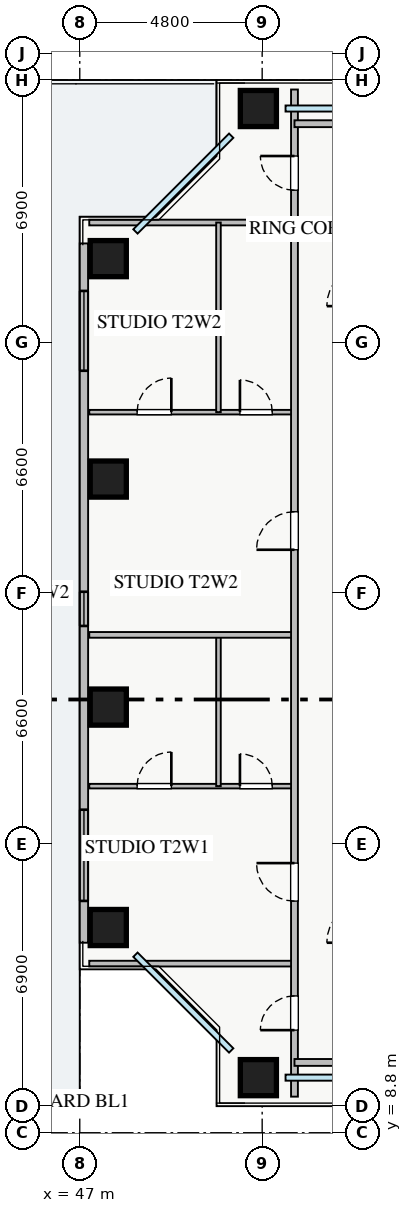
"""IFC4 building model, lengths in metres.
Left out: names, types, materials, properties, quantities, classifications, styles, units other than length and angle.
Written with IfcOpenShell. Run it as: python <this file> out.ifc"""

import sys

from ifc_helpers import new_model, si_unit, direction, frame, frame_2d, origin, origin_2d, place, context, subcontext, project, spatial, rectangle, extrude, source, transform, mapped, element, fill, save


model = new_model("IFC4")
c1 = context("Model", 3, precision=1e-05, world=origin(), true_north=direction((0.0, 1.0)))
c2 = subcontext(c1, "Body", "Model", "MODEL_VIEW")
j1 = project(units=[si_unit("LENGTHUNIT", "METRE"), si_unit("PLANEANGLEUNIT", "RADIAN")], contexts=[c1])
p1 = place(None, origin())
s1 = spatial("IfcSite", under=j1, at=p1, CompositionType="ELEMENT")
p2 = place(p1, origin())
s2 = spatial("IfcBuilding", under=s1, at=p2, CompositionType="ELEMENT")
p3 = place(p2, frame((0.0, 0.0, 23.0)))
s3 = spatial("IfcBuildingStorey", under=s2, at=p3, CompositionType="ELEMENT", Elevation=23.0)
m1 = source(origin(), c2, "Body", "SweptSolid", [
    extrude(rectangle(XDim=0.95, YDim=0.95, at=origin_2d()), origin(), (0.0, 0.0, 1.0), 3.25),
])
for number, where, z_axis, x_axis in (
    (1, (51.7, 10.25, 0.0), (0.0, 0.0, 1.0), (1.0, 0.0, 0.0)),
    (2, (51.7, 35.75, 0.0), (0.0, 0.0, 1.0), (1.0, 0.0, 0.0)),
    (3, (47.75, 14.2, 0.0), (0.0, 0.0, 1.0), (1.0, 0.0, 0.0)),
    (4, (47.75, 20.0, 0.0), (0.0, 0.0, 1.0), (1.0, 0.0, 0.0)),
    (5, (47.75, 26.0, 0.0), (0.0, 0.0, 1.0), (1.0, 0.0, 0.0)),
    (6, (47.75, 31.8, 0.0), (0.0, 0.0, 1.0), (1.0, 0.0, 0.0)),
):
    element("IfcColumn", number, at=place(p3, frame(where, z_axis=z_axis, x_axis=x_axis)), inside=s3, PredefinedType="COLUMN", context=c2, shape_type="MappedRepresentation", body=[
        mapped(m1, transform((0.0, 0.0, 0.0), x_axis=(1.0, 0.0, 0.0), y_axis=(0.0, 1.0, 0.0), z_axis=(0.0, 0.0, 1.0), scale=1.0)),
    ])
p4 = place(p3, frame((47.11, 13.8, 0.0), z_axis=(0.0, 0.0, 1.0), x_axis=(0.0, 1.0, 0.0)))
e7 = element("IfcWall", 7, at=p4, inside=s3, PredefinedType="STANDARD", context=c2, shape_type="SweptSolid", body=[
    extrude(rectangle(XDim=18.4, YDim=0.22, at=frame_2d((9.2, 0.0))), origin(), (0.0, 0.0, 1.0), 2.61),
])
p5 = place(p4, frame((1.1, 0.0, 0.9)))
e8 = element("IfcOpeningElement", 8, at=p5, cuts=e7, PredefinedType="OPENING", context=c2, shape_type="SweptSolid", body=[
    extrude(rectangle(XDim=2.4, YDim=1.48, at=frame_2d((1.2, 0.74))), frame((0.0, 0.12, 0.0), z_axis=(0.0, -1.0, 0.0), x_axis=(1.0, 0.0, 0.0)), (0.0, 0.0, 1.0), 0.24),
])
p6 = place(p4, frame((15.05, 0.0, 0.9)))
e9 = element("IfcOpeningElement", 9, at=p6, cuts=e7, PredefinedType="OPENING", context=c2, shape_type="SweptSolid", body=[
    extrude(rectangle(XDim=2.1, YDim=1.48, at=frame_2d((1.05, 0.74))), frame((0.0, 0.12, 0.0), z_axis=(0.0, -1.0, 0.0), x_axis=(1.0, 0.0, 0.0)), (0.0, 0.0, 1.0), 0.24),
])
p7 = place(p4, frame((8.335, 0.0, 0.9)))
e10 = element("IfcOpeningElement", 10, at=p7, cuts=e7, PredefinedType="OPENING", context=c2, shape_type="SweptSolid", body=[
    extrude(rectangle(XDim=0.9, YDim=1.2, at=frame_2d((0.45, 0.6))), frame((0.0, 0.12, 0.0), z_axis=(0.0, -1.0, 0.0), x_axis=(1.0, 0.0, 0.0)), (0.0, 0.0, 1.0), 0.24),
])
for number, where, z_axis, x_axis in (
    (11, (47.25, 32.75, 0.0), (0.0, 0.0, 1.0), (1.0, 0.0, 0.0)),
    (12, (47.25, 13.25, 0.0), (0.0, 0.0, 1.0), (1.0, 0.0, 0.0)),
):
    element("IfcWall", number, at=place(p3, frame(where, z_axis=z_axis, x_axis=x_axis)), inside=s3, PredefinedType="PARTITIONING", context=c2, shape_type="SweptSolid", body=[
        extrude(rectangle(XDim=5.4, YDim=0.15, at=frame_2d((2.7, 0.0))), origin(), (0.0, 0.0, 1.0), 3.07),
    ])
p8 = place(p3, frame((47.25, 17.92, 0.0), z_axis=(0.0, 0.0, 1.0), x_axis=(1.0, 0.0, 0.0)))
e13 = element("IfcWall", 13, at=p8, inside=s3, PredefinedType="PLUMBINGWALL", context=c2, shape_type="SweptSolid", body=[
    extrude(rectangle(XDim=5.4, YDim=0.12, at=frame_2d((2.7, 0.0))), origin(), (0.0, 0.0, 1.0), 3.07),
])
p9 = place(p8, frame((1.26, 0.0, 0.0)))
e14 = element("IfcOpeningElement", 14, at=p9, cuts=e13, PredefinedType="OPENING", context=c2, shape_type="SweptSolid", body=[
    extrude(rectangle(XDim=0.9, YDim=2.05, at=frame_2d((0.45, 1.025))), frame((0.0, 0.07, 0.0), z_axis=(0.0, -1.0, 0.0), x_axis=(1.0, 0.0, 0.0)), (0.0, 0.0, 1.0), 0.14),
])
p10 = place(p8, frame((3.965, 0.0, 0.0)))
e15 = element("IfcOpeningElement", 15, at=p10, cuts=e13, PredefinedType="OPENING", context=c2, shape_type="SweptSolid", body=[
    extrude(rectangle(XDim=0.85, YDim=2.05, at=frame_2d((0.425, 1.025))), frame((0.0, 0.07, 0.0), z_axis=(0.0, -1.0, 0.0), x_axis=(1.0, 0.0, 0.0)), (0.0, 0.0, 1.0), 0.14),
])
p11 = place(p3, frame((50.65, 17.92, 0.0), z_axis=(0.0, 0.0, 1.0), x_axis=(0.0, 1.0, 0.0)))
e16 = element("IfcWall", 16, at=p11, inside=s3, PredefinedType="PLUMBINGWALL", context=c2, shape_type="SweptSolid", body=[
    extrude(rectangle(XDim=3.98, YDim=0.12, at=frame_2d((1.99, 0.0))), origin(), (0.0, 0.0, 1.0), 3.07),
])
p12 = place(p3, frame((47.25, 27.76, 0.0), z_axis=(0.0, 0.0, 1.0), x_axis=(1.0, 0.0, 0.0)))
e17 = element("IfcWall", 17, at=p12, inside=s3, PredefinedType="PLUMBINGWALL", context=c2, shape_type="SweptSolid", body=[
    extrude(rectangle(XDim=5.4, YDim=0.12, at=frame_2d((2.7, 0.0))), origin(), (0.0, 0.0, 1.0), 3.07),
])
p13 = place(p12, frame((1.26, 0.0, 0.0)))
e18 = element("IfcOpeningElement", 18, at=p13, cuts=e17, PredefinedType="OPENING", context=c2, shape_type="SweptSolid", body=[
    extrude(rectangle(XDim=0.9, YDim=2.05, at=frame_2d((0.45, 1.025))), frame((0.0, 0.07, 0.0), z_axis=(0.0, -1.0, 0.0), x_axis=(1.0, 0.0, 0.0)), (0.0, 0.0, 1.0), 0.14),
])
p14 = place(p12, frame((3.965, 0.0, 0.0)))
e19 = element("IfcOpeningElement", 19, at=p14, cuts=e17, PredefinedType="OPENING", context=c2, shape_type="SweptSolid", body=[
    extrude(rectangle(XDim=0.85, YDim=2.05, at=frame_2d((0.425, 1.025))), frame((0.0, 0.07, 0.0), z_axis=(0.0, -1.0, 0.0), x_axis=(1.0, 0.0, 0.0)), (0.0, 0.0, 1.0), 0.14),
])
p15 = place(p3, frame((50.65, 27.76, 0.0), z_axis=(0.0, 0.0, 1.0), x_axis=(0.0, 1.0, 0.0)))
e20 = element("IfcWall", 20, at=p15, inside=s3, PredefinedType="PLUMBINGWALL", context=c2, shape_type="SweptSolid", body=[
    extrude(rectangle(XDim=4.99, YDim=0.12, at=frame_2d((2.495, 0.0))), origin(), (0.0, 0.0, 1.0), 3.07),
])
p16 = place(p3, frame((47.25, 21.9, 0.0), z_axis=(0.0, 0.0, 1.0), x_axis=(1.0, 0.0, 0.0)))
e21 = element("IfcWall", 21, at=p16, inside=s3, PredefinedType="PARTITIONING", context=c2, shape_type="SweptSolid", body=[
    extrude(rectangle(XDim=5.4, YDim=0.15, at=frame_2d((2.7, 0.0))), origin(), (0.0, 0.0, 1.0), 3.07),
])
p17 = place(p3, frame((52.65, 9.75, 0.0), z_axis=(0.0, 0.0, 1.0), x_axis=(0.0, 1.0, 0.0)))
e22 = element("IfcWall", 22, at=p17, inside=s3, PredefinedType="PARTITIONING", context=c2, shape_type="SweptSolid", body=[
    extrude(rectangle(XDim=26.5, YDim=0.18, at=frame_2d((13.25, 0.0))), origin(), (0.0, 0.0, 1.0), 3.07),
])
p18 = place(p17, frame((23.85, 0.0, 0.0)))
e23 = element("IfcOpeningElement", 23, at=p18, cuts=e22, PredefinedType="OPENING", context=c2, shape_type="SweptSolid", body=[
    extrude(rectangle(XDim=0.9, YDim=2.05, at=frame_2d((0.45, 1.025))), frame((0.0, 0.1, 0.0), z_axis=(0.0, -1.0, 0.0), x_axis=(1.0, 0.0, 0.0)), (0.0, 0.0, 1.0), 0.2),
])
p19 = place(p17, frame((1.75, 0.0, 0.0)))
e24 = element("IfcOpeningElement", 24, at=p19, cuts=e22, PredefinedType="OPENING", context=c2, shape_type="SweptSolid", body=[
    extrude(rectangle(XDim=0.9, YDim=2.05, at=frame_2d((0.45, 1.025))), frame((0.0, 0.1, 0.0), z_axis=(0.0, -1.0, 0.0), x_axis=(1.0, 0.0, 0.0)), (0.0, 0.0, 1.0), 0.2),
])
p20 = place(p17, frame((5.145, 0.0, 0.0)))
e25 = element("IfcOpeningElement", 25, at=p20, cuts=e22, PredefinedType="OPENING", context=c2, shape_type="SweptSolid", body=[
    extrude(rectangle(XDim=1.0, YDim=2.05, at=frame_2d((0.5, 1.025))), frame((0.0, 0.1, 0.0), z_axis=(0.0, -1.0, 0.0), x_axis=(1.0, 0.0, 0.0)), (0.0, 0.0, 1.0), 0.2),
])
p21 = place(p17, frame((14.39, 0.0, 0.0)))
e26 = element("IfcOpeningElement", 26, at=p21, cuts=e22, PredefinedType="OPENING", context=c2, shape_type="SweptSolid", body=[
    extrude(rectangle(XDim=1.0, YDim=2.05, at=frame_2d((0.5, 1.025))), frame((0.0, 0.1, 0.0), z_axis=(0.0, -1.0, 0.0), x_axis=(1.0, 0.0, 0.0)), (0.0, 0.0, 1.0), 0.2),
])
p22 = place(p3, frame((52.65, 35.35, 0.0), z_axis=(0.0, 0.0, 1.0), x_axis=(1.0, 0.0, 0.0)))
e27 = element("IfcWall", 27, at=p22, inside=s3, PredefinedType="PARTITIONING", context=c2, shape_type="SweptSolid", body=[
    extrude(rectangle(XDim=17.0, YDim=0.18, at=frame_2d((8.5, 0.0))), origin(), (0.0, 0.0, 1.0), 3.07),
])
p23 = place(p22, frame((3.825, 0.0, 0.0)))
e28 = element("IfcOpeningElement", 28, at=p23, cuts=e27, PredefinedType="OPENING", context=c2, shape_type="SweptSolid", body=[
    extrude(rectangle(XDim=0.9, YDim=2.05, at=frame_2d((0.45, 1.025))), frame((0.0, 0.1, 0.0), z_axis=(0.0, -1.0, 0.0), x_axis=(1.0, 0.0, 0.0)), (0.0, 0.0, 1.0), 0.2),
])
p24 = place(p22, frame((12.325, 0.0, 0.0)))
e29 = element("IfcOpeningElement", 29, at=p24, cuts=e27, PredefinedType="OPENING", context=c2, shape_type="SweptSolid", body=[
    extrude(rectangle(XDim=0.9, YDim=2.05, at=frame_2d((0.45, 1.025))), frame((0.0, 0.1, 0.0), z_axis=(0.0, -1.0, 0.0), x_axis=(1.0, 0.0, 0.0)), (0.0, 0.0, 1.0), 0.2),
])
p25 = place(p3, frame((52.65, 10.65, 0.0), z_axis=(0.0, 0.0, 1.0), x_axis=(1.0, 0.0, 0.0)))
e30 = element("IfcWall", 30, at=p25, inside=s3, PredefinedType="PARTITIONING", context=c2, shape_type="SweptSolid", body=[
    extrude(rectangle(XDim=17.0, YDim=0.18, at=frame_2d((8.5, 0.0))), origin(), (0.0, 0.0, 1.0), 3.07),
])
p26 = place(p25, frame((4.375, 0.0, 0.0)))
e31 = element("IfcOpeningElement", 31, at=p26, cuts=e30, PredefinedType="OPENING", context=c2, shape_type="SweptSolid", body=[
    extrude(rectangle(XDim=0.9, YDim=2.05, at=frame_2d((0.45, 1.025))), frame((0.0, 0.1, 0.0), z_axis=(0.0, -1.0, 0.0), x_axis=(1.0, 0.0, 0.0)), (0.0, 0.0, 1.0), 0.2),
])
p27 = place(p25, frame((12.875, 0.0, 0.0)))
e32 = element("IfcOpeningElement", 32, at=p27, cuts=e30, PredefinedType="OPENING", context=c2, shape_type="SweptSolid", body=[
    extrude(rectangle(XDim=0.9, YDim=2.05, at=frame_2d((0.45, 1.025))), frame((0.0, 0.1, 0.0), z_axis=(0.0, -1.0, 0.0), x_axis=(1.0, 0.0, 0.0)), (0.0, 0.0, 1.0), 0.2),
])
m2 = source(origin(), c2, "Body", "SweptSolid", [
    extrude(rectangle(XDim=2.4, YDim=1.48, at=frame_2d((1.2, 0.74))), frame((0.0, 0.03, 0.0), z_axis=(0.0, -1.0, 0.0), x_axis=(1.0, 0.0, 0.0)), (0.0, 0.0, 1.0), 0.06),
])
p28 = place(p5, origin())
e33 = element("IfcWindow", 33, at=p28, inside=s3, PartitioningType="TRIPLE_PANEL_VERTICAL", PredefinedType="WINDOW", context=c2, shape_type="MappedRepresentation", body=[
    mapped(m2, transform((0.0, 0.0, 0.0), x_axis=(1.0, 0.0, 0.0), y_axis=(0.0, 1.0, 0.0), z_axis=(0.0, 0.0, 1.0), scale=1.0)),
])
fill(e8, e33)
m3 = source(origin(), c2, "Body", "SweptSolid", [
    extrude(rectangle(XDim=2.1, YDim=1.48, at=frame_2d((1.05, 0.74))), frame((0.0, 0.03, 0.0), z_axis=(0.0, -1.0, 0.0), x_axis=(1.0, 0.0, 0.0)), (0.0, 0.0, 1.0), 0.06),
])
p29 = place(p6, origin())
e34 = element("IfcWindow", 34, at=p29, inside=s3, PartitioningType="TRIPLE_PANEL_VERTICAL", PredefinedType="WINDOW", context=c2, shape_type="MappedRepresentation", body=[
    mapped(m3, transform((0.0, 0.0, 0.0), x_axis=(1.0, 0.0, 0.0), y_axis=(0.0, 1.0, 0.0), z_axis=(0.0, 0.0, 1.0), scale=1.0)),
])
fill(e9, e34)
m4 = source(origin(), c2, "Body", "SweptSolid", [
    extrude(rectangle(XDim=0.9, YDim=2.05, at=frame_2d((0.45, 1.025))), frame((0.0, 0.025, 0.0), z_axis=(0.0, -1.0, 0.0), x_axis=(1.0, 0.0, 0.0)), (0.0, 0.0, 1.0), 0.05),
])
p30 = place(p9, origin())
e35 = element("IfcDoor", 35, at=p30, inside=s3, OperationType="SINGLE_SWING_RIGHT", PredefinedType="DOOR", context=c2, shape_type="MappedRepresentation", body=[
    mapped(m4, transform((0.0, 0.0, 0.0), x_axis=(1.0, 0.0, 0.0), y_axis=(0.0, 1.0, 0.0), z_axis=(0.0, 0.0, 1.0), scale=1.0)),
])
fill(e14, e35)
m5 = source(origin(), c2, "Body", "SweptSolid", [
    extrude(rectangle(XDim=0.85, YDim=2.05, at=frame_2d((0.425, 1.025))), frame((0.0, 0.025, 0.0), z_axis=(0.0, -1.0, 0.0), x_axis=(1.0, 0.0, 0.0)), (0.0, 0.0, 1.0), 0.05),
])
p31 = place(p10, origin())
e36 = element("IfcDoor", 36, at=p31, inside=s3, OperationType="SINGLE_SWING_LEFT", PredefinedType="DOOR", context=c2, shape_type="MappedRepresentation", body=[
    mapped(m5, transform((0.0, 0.0, 0.0), x_axis=(1.0, 0.0, 0.0), y_axis=(0.0, 1.0, 0.0), z_axis=(0.0, 0.0, 1.0), scale=1.0)),
])
fill(e15, e36)
p32 = place(p13, origin())
e37 = element("IfcDoor", 37, at=p32, inside=s3, OperationType="SINGLE_SWING_RIGHT", PredefinedType="DOOR", context=c2, shape_type="MappedRepresentation", body=[
    mapped(m4, transform((0.0, 0.0, 0.0), x_axis=(1.0, 0.0, 0.0), y_axis=(0.0, 1.0, 0.0), z_axis=(0.0, 0.0, 1.0), scale=1.0)),
])
fill(e18, e37)
p33 = place(p14, origin())
e38 = element("IfcDoor", 38, at=p33, inside=s3, OperationType="SINGLE_SWING_LEFT", PredefinedType="DOOR", context=c2, shape_type="MappedRepresentation", body=[
    mapped(m5, transform((0.0, 0.0, 0.0), x_axis=(1.0, 0.0, 0.0), y_axis=(0.0, 1.0, 0.0), z_axis=(0.0, 0.0, 1.0), scale=1.0)),
])
fill(e19, e38)
p34 = place(p18, origin())
e39 = element("IfcDoor", 39, at=p34, inside=s3, OperationType="SINGLE_SWING_RIGHT", PredefinedType="DOOR", context=c2, shape_type="MappedRepresentation", body=[
    mapped(m4, transform((0.0, 0.0, 0.0), x_axis=(1.0, 0.0, 0.0), y_axis=(0.0, 1.0, 0.0), z_axis=(0.0, 0.0, 1.0), scale=1.0)),
])
fill(e23, e39)
p35 = place(p19, origin())
e40 = element("IfcDoor", 40, at=p35, inside=s3, OperationType="SINGLE_SWING_LEFT", PredefinedType="DOOR", context=c2, shape_type="MappedRepresentation", body=[
    mapped(m4, transform((0.0, 0.0, 0.0), x_axis=(1.0, 0.0, 0.0), y_axis=(0.0, 1.0, 0.0), z_axis=(0.0, 0.0, 1.0), scale=1.0)),
])
fill(e24, e40)
m6 = source(origin(), c2, "Body", "SweptSolid", [
    extrude(rectangle(XDim=1.0, YDim=2.05, at=frame_2d((0.5, 1.025))), frame((0.0, 0.025, 0.0), z_axis=(0.0, -1.0, 0.0), x_axis=(1.0, 0.0, 0.0)), (0.0, 0.0, 1.0), 0.05),
])
p36 = place(p20, origin())
e41 = element("IfcDoor", 41, at=p36, inside=s3, OperationType="SINGLE_SWING_RIGHT", PredefinedType="DOOR", context=c2, shape_type="MappedRepresentation", body=[
    mapped(m6, transform((0.0, 0.0, 0.0), x_axis=(1.0, 0.0, 0.0), y_axis=(0.0, 1.0, 0.0), z_axis=(0.0, 0.0, 1.0), scale=1.0)),
])
fill(e25, e41)
p37 = place(p21, origin())
e42 = element("IfcDoor", 42, at=p37, inside=s3, OperationType="SINGLE_SWING_LEFT", PredefinedType="DOOR", context=c2, shape_type="MappedRepresentation", body=[
    mapped(m6, transform((0.0, 0.0, 0.0), x_axis=(1.0, 0.0, 0.0), y_axis=(0.0, 1.0, 0.0), z_axis=(0.0, 0.0, 1.0), scale=1.0)),
])
fill(e26, e42)
m7 = source(origin(), c2, "Body", "SweptSolid", [
    extrude(rectangle(XDim=0.9, YDim=1.2, at=frame_2d((0.45, 0.6))), frame((0.0, 0.03, 0.0), z_axis=(0.0, -1.0, 0.0), x_axis=(1.0, 0.0, 0.0)), (0.0, 0.0, 1.0), 0.06),
])
p38 = place(p7, origin())
e43 = element("IfcWindow", 43, at=p38, inside=s3, PartitioningType="SINGLE_PANEL", PredefinedType="WINDOW", context=c2, shape_type="MappedRepresentation", body=[
    mapped(m7, transform((0.0, 0.0, 0.0), x_axis=(1.0, 0.0, 0.0), y_axis=(0.0, 1.0, 0.0), z_axis=(0.0, 0.0, 1.0), scale=1.0)),
])
fill(e10, e43)
save(model, sys.argv[1])
